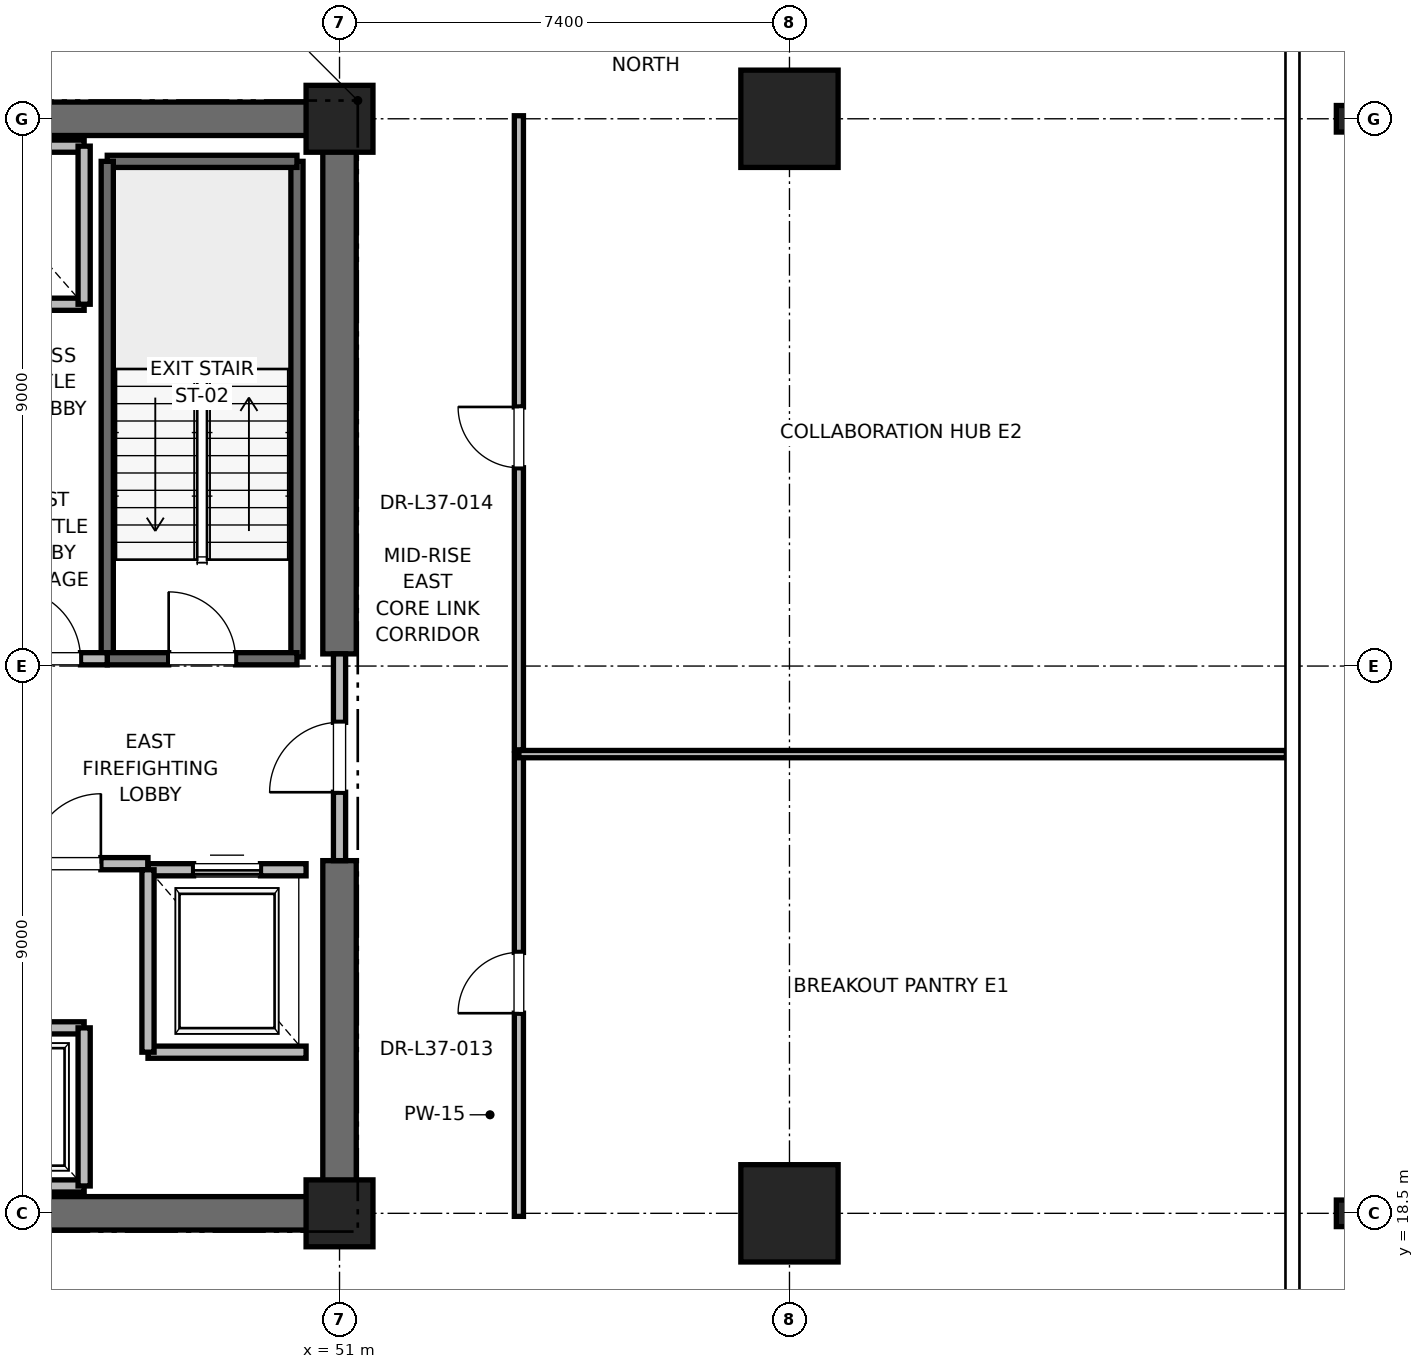
"""IFC4 building model, lengths in metres.
Left out: names, types, materials, properties, quantities, classifications, styles, units other than length and angle.
Written with IfcOpenShell. Run it as: python <this file> out.ifc"""

import sys

from ifc_helpers import new_model, si_unit, direction, frame, frame_2d, origin, origin_2d, place, context, subcontext, project, spatial, rectangle, i_section, extrude, element, fill, save


model = new_model("IFC4")
c1 = context("Model", 3, precision=1e-05, world=origin(), true_north=direction((0.0, 1.0)))
c2 = subcontext(c1, "Body", "Model", "MODEL_VIEW")
j1 = project(units=[si_unit("LENGTHUNIT", "METRE"), si_unit("PLANEANGLEUNIT", "RADIAN")], contexts=[c1])
p1 = place(None, origin())
s1 = spatial("IfcSite", under=j1, at=p1, CompositionType="ELEMENT")
p2 = place(p1, origin())
s2 = spatial("IfcBuilding", under=s1, at=p2, CompositionType="ELEMENT")
p3 = place(p2, frame((0.0, 0.0, 160.4)))
s3 = spatial("IfcBuildingStorey", under=s2, at=p3, CompositionType="ELEMENT", Elevation=160.4)
for number, where, z_axis, x_axis in (
    (1, (58.4, 18.5, 0.0), (0.0, 0.0, 1.0), (1.0, 0.0, 0.0)),
    (2, (58.4, 36.5, 0.0), (0.0, 0.0, 1.0), (1.0, 0.0, 0.0)),
):
    element("IfcColumn", number, at=place(p3, frame(where, z_axis=z_axis, x_axis=x_axis)), inside=s3, PredefinedType="COLUMN", context=c2, shape_type="SweptSolid", body=[
        extrude(rectangle(XDim=1.6, YDim=1.6, at=origin_2d()), origin(), (0.0, 0.0, 1.0), 4.0),
    ])
for number, where, z_axis, x_axis in (
    (3, (67.6, 18.5, 0.0), (0.0, 0.0, 1.0), (1.0, 0.0, 0.0)),
    (4, (67.6, 36.5, 0.0), (0.0, 0.0, 1.0), (1.0, 0.0, 0.0)),
):
    element("IfcColumn", number, at=place(p3, frame(where, z_axis=z_axis, x_axis=x_axis)), inside=s3, PredefinedType="COLUMN", context=c2, shape_type="SweptSolid", body=[
        extrude(i_section(OverallWidth=0.412, OverallDepth=0.437, WebThickness=0.036, FlangeThickness=0.058, FilletRadius=0.015, at=origin_2d()), origin(), (0.0, 0.0, 1.0), 4.0),
    ])
for number, where, z_axis, x_axis in (
    (5, (51.0, 18.5, 0.0), (0.0, 0.0, 1.0), (1.0, 0.0, 0.0)),
    (6, (51.0, 36.5, 0.0), (0.0, 0.0, 1.0), (1.0, 0.0, 0.0)),
):
    element("IfcColumn", number, at=place(p3, frame(where, z_axis=z_axis, x_axis=x_axis)), inside=s3, PredefinedType="PILASTER", context=c2, shape_type="SweptSolid", body=[
        extrude(rectangle(XDim=1.1, YDim=1.1, at=origin_2d()), origin(), (0.0, 0.0, 1.0), 4.0),
    ])
p4 = place(p3, frame((41.8, 18.5, 0.0), z_axis=(0.0, 0.0, 1.0), x_axis=(1.0, 0.0, 0.0)))
e7 = element("IfcWall", 7, at=p4, inside=s3, PredefinedType="SHEAR", context=c2, shape_type="SweptSolid", body=[
    extrude(rectangle(XDim=9.2, YDim=0.55, at=frame_2d((4.6, 0.0))), origin(), (0.0, 0.0, 1.0), 3.775),
])
for number, where, z_axis, x_axis in (
    (8, (45.2, 36.5, 0.0), (0.0, 0.0, 1.0), (1.0, 0.0, 0.0)),
    (9, (51.0, 18.5, 0.0), (0.0, 0.0, 1.0), (0.0, 1.0, 0.0)),
):
    element("IfcWall", number, at=place(p3, frame(where, z_axis=z_axis, x_axis=x_axis)), inside=s3, PredefinedType="SHEAR", context=c2, shape_type="SweptSolid", body=[
        extrude(rectangle(XDim=5.8, YDim=0.55, at=frame_2d((2.9, 0.0))), origin(), (0.0, 0.0, 1.0), 3.775),
    ])
p5 = place(p3, frame((51.0, 27.7, 0.0), z_axis=(0.0, 0.0, 1.0), x_axis=(0.0, 1.0, 0.0)))
e10 = element("IfcWall", 10, at=p5, inside=s3, PredefinedType="SHEAR", context=c2, shape_type="SweptSolid", body=[
    extrude(rectangle(XDim=8.8, YDim=0.55, at=frame_2d((4.4, 0.0))), origin(), (0.0, 0.0, 1.0), 3.775),
])
p6 = place(p3, frame((50.3, 27.65, 0.0), z_axis=(0.0, 0.0, 1.0), x_axis=(0.0, 1.0, 0.0)))
e11 = element("IfcWall", 11, at=p6, inside=s3, PredefinedType="SOLIDWALL", context=c2, shape_type="SweptSolid", body=[
    extrude(rectangle(XDim=8.15, YDim=0.2, at=frame_2d((4.075, 0.0))), origin(), (0.0, 0.0, 1.0), 3.775),
])
p7 = place(p3, frame((47.18, 35.8, 0.0), z_axis=(0.0, 0.0, 1.0), x_axis=(1.0, 0.0, 0.0)))
e12 = element("IfcWall", 12, at=p7, inside=s3, PredefinedType="SOLIDWALL", context=c2, shape_type="SweptSolid", body=[
    extrude(rectangle(XDim=3.12, YDim=0.2, at=frame_2d((1.56, 0.0))), origin(), (0.0, 0.0, 1.0), 3.775),
])
p8 = place(p3, frame((47.18, 27.62, 0.0), z_axis=(0.0, 0.0, 1.0), x_axis=(0.0, 1.0, 0.0)))
e13 = element("IfcWall", 13, at=p8, inside=s3, PredefinedType="SOLIDWALL", context=c2, shape_type="SweptSolid", body=[
    extrude(rectangle(XDim=8.18, YDim=0.2, at=frame_2d((4.09, 0.0))), origin(), (0.0, 0.0, 1.0), 3.775),
])
p9 = place(p3, frame((47.18, 27.62, 0.0), z_axis=(0.0, 0.0, 1.0), x_axis=(1.0, 0.0, 0.0)))
e14 = element("IfcWall", 14, at=p9, inside=s3, PredefinedType="SOLIDWALL", context=c2, shape_type="SweptSolid", body=[
    extrude(rectangle(XDim=3.12, YDim=0.2, at=frame_2d((1.56, 0.0))), origin(), (0.0, 0.0, 1.0), 3.775),
])
p10 = place(p9, frame((1.01, 0.0, 0.0)))
e15 = element("IfcOpeningElement", 15, at=p10, cuts=e14, PredefinedType="OPENING", context=c2, shape_type="SweptSolid", body=[
    extrude(rectangle(XDim=1.1, YDim=2.15, at=frame_2d((0.55, 1.075))), frame((0.0, 0.1, 0.0), z_axis=(0.0, -1.0, 0.0), x_axis=(1.0, 0.0, 0.0)), (0.0, 0.0, 1.0), 0.2),
])
p11 = place(p3, frame((45.15, 24.25, 0.0), z_axis=(0.0, 0.0, 1.0), x_axis=(1.0, 0.0, 0.0)))
e16 = element("IfcWall", 16, at=p11, inside=s3, PredefinedType="PARTITIONING", context=c2, shape_type="SweptSolid", body=[
    extrude(rectangle(XDim=2.7, YDim=0.2, at=frame_2d((1.35, 0.0))), origin(), (0.0, 0.0, 1.0), 3.775),
])
p12 = place(p11, frame((0.775, 0.0, 0.0)))
e17 = element("IfcOpeningElement", 17, at=p12, cuts=e16, PredefinedType="OPENING", context=c2, shape_type="SweptSolid", body=[
    extrude(rectangle(XDim=1.15, YDim=2.2, at=frame_2d((0.575, 1.1))), frame((0.0, 0.1, 0.0), z_axis=(0.0, -1.0, 0.0), x_axis=(1.0, 0.0, 0.0)), (0.0, 0.0, 1.0), 0.2),
])
p13 = place(p3, frame((45.15, 27.62, 0.0), z_axis=(0.0, 0.0, 1.0), x_axis=(1.0, 0.0, 0.0)))
e18 = element("IfcWall", 18, at=p13, inside=s3, PredefinedType="PARTITIONING", context=c2, shape_type="SweptSolid", body=[
    extrude(rectangle(XDim=2.03, YDim=0.2, at=frame_2d((1.015, 0.0))), origin(), (0.0, 0.0, 1.0), 3.775),
])
p14 = place(p13, frame((0.44, 0.0, 0.0)))
e19 = element("IfcOpeningElement", 19, at=p14, cuts=e18, PredefinedType="OPENING", context=c2, shape_type="SweptSolid", body=[
    extrude(rectangle(XDim=1.15, YDim=2.2, at=frame_2d((0.575, 1.1))), frame((0.0, 0.1, 0.0), z_axis=(0.0, -1.0, 0.0), x_axis=(1.0, 0.0, 0.0)), (0.0, 0.0, 1.0), 0.2),
])
p15 = place(p3, frame((51.0, 24.3, 0.0), z_axis=(0.0, 0.0, 1.0), x_axis=(0.0, 1.0, 0.0)))
e20 = element("IfcWall", 20, at=p15, inside=s3, PredefinedType="PARTITIONING", context=c2, shape_type="SweptSolid", body=[
    extrude(rectangle(XDim=3.4, YDim=0.2, at=frame_2d((1.7, 0.0))), origin(), (0.0, 0.0, 1.0), 2.755),
])
p16 = place(p15, frame((1.125, 0.0, 0.0)))
e21 = element("IfcOpeningElement", 21, at=p16, cuts=e20, PredefinedType="OPENING", context=c2, shape_type="SweptSolid", body=[
    extrude(rectangle(XDim=1.15, YDim=2.2, at=frame_2d((0.575, 1.1))), frame((0.0, 0.1, 0.0), z_axis=(0.0, -1.0, 0.0), x_axis=(1.0, 0.0, 0.0)), (0.0, 0.0, 1.0), 0.2),
])
p17 = place(p3, frame((47.85, 21.15, 0.0), z_axis=(0.0, 0.0, 1.0), x_axis=(1.0, 0.0, 0.0)))
e22 = element("IfcWall", 22, at=p17, inside=s3, PredefinedType="SOLIDWALL", context=c2, shape_type="SweptSolid", body=[
    extrude(rectangle(XDim=2.6, YDim=0.2, at=frame_2d((1.3, 0.0))), origin(), (0.0, 0.0, 1.0), 3.775),
])
p18 = place(p3, frame((50.45, 24.15, 0.0), z_axis=(0.0, 0.0, 1.0), x_axis=(-1.0, 0.0, 0.0)))
e23 = element("IfcWall", 23, at=p18, inside=s3, PredefinedType="SOLIDWALL", context=c2, shape_type="SweptSolid", body=[
    extrude(rectangle(XDim=2.6, YDim=0.2, at=frame_2d((1.3, 0.0))), origin(), (0.0, 0.0, 1.0), 2.755),
])
p19 = place(p18, frame((0.75, 0.0, 0.0)))
e24 = element("IfcOpeningElement", 24, at=p19, cuts=e23, PredefinedType="OPENING", context=c2, shape_type="SweptSolid", body=[
    extrude(rectangle(XDim=1.1, YDim=2.2, at=frame_2d((0.55, 1.1))), frame((0.0, 0.1, 0.0), z_axis=(0.0, -1.0, 0.0), x_axis=(1.0, 0.0, 0.0)), (0.0, 0.0, 1.0), 0.2),
])
p20 = place(p3, frame((47.85, 24.15, 0.0), z_axis=(0.0, 0.0, 1.0), x_axis=(0.0, -1.0, 0.0)))
e25 = element("IfcWall", 25, at=p20, inside=s3, PredefinedType="SOLIDWALL", context=c2, shape_type="SweptSolid", body=[
    extrude(rectangle(XDim=3.0, YDim=0.2, at=frame_2d((1.5, 0.0))), origin(), (0.0, 0.0, 1.0), 3.775),
])
p21 = place(p3, frame((44.5, 18.95, 0.0), z_axis=(0.0, 0.0, 1.0), x_axis=(1.0, 0.0, 0.0)))
e26 = element("IfcWall", 26, at=p21, inside=s3, PredefinedType="SOLIDWALL", context=c2, shape_type="SweptSolid", body=[
    extrude(rectangle(XDim=2.3, YDim=0.2, at=frame_2d((1.15, 0.0))), origin(), (0.0, 0.0, 1.0), 3.775),
])
p22 = place(p3, frame((46.8, 21.55, 0.0), z_axis=(0.0, 0.0, 1.0), x_axis=(-1.0, 0.0, 0.0)))
e27 = element("IfcWall", 27, at=p22, inside=s3, PredefinedType="SOLIDWALL", context=c2, shape_type="SweptSolid", body=[
    extrude(rectangle(XDim=2.3, YDim=0.2, at=frame_2d((1.15, 0.0))), origin(), (0.0, 0.0, 1.0), 3.775),
])
p23 = place(p22, frame((0.6, 0.0, 0.0)))
e28 = element("IfcOpeningElement", 28, at=p23, cuts=e27, PredefinedType="OPENING", context=c2, shape_type="SweptSolid", body=[
    extrude(rectangle(XDim=1.1, YDim=2.2, at=frame_2d((0.55, 1.1))), frame((0.0, 0.1, 0.0), z_axis=(0.0, -1.0, 0.0), x_axis=(1.0, 0.0, 0.0)), (0.0, 0.0, 1.0), 0.2),
])
p24 = place(p3, frame((46.8, 18.95, 0.0), z_axis=(0.0, 0.0, 1.0), x_axis=(0.0, 1.0, 0.0)))
e29 = element("IfcWall", 29, at=p24, inside=s3, PredefinedType="SOLIDWALL", context=c2, shape_type="SweptSolid", body=[
    extrude(rectangle(XDim=2.6, YDim=0.2, at=frame_2d((1.3, 0.0))), origin(), (0.0, 0.0, 1.0), 3.775),
])
p25 = place(p3, frame((44.5, 33.45, 0.0), z_axis=(0.0, 0.0, 1.0), x_axis=(1.0, 0.0, 0.0)))
e30 = element("IfcWall", 30, at=p25, inside=s3, PredefinedType="SOLIDWALL", context=c2, shape_type="SweptSolid", body=[
    extrude(rectangle(XDim=2.3, YDim=0.2, at=frame_2d((1.15, 0.0))), origin(), (0.0, 0.0, 1.0), 3.775),
])
p26 = place(p3, frame((46.8, 36.05, 0.0), z_axis=(0.0, 0.0, 1.0), x_axis=(-1.0, 0.0, 0.0)))
e31 = element("IfcWall", 31, at=p26, inside=s3, PredefinedType="SOLIDWALL", context=c2, shape_type="SweptSolid", body=[
    extrude(rectangle(XDim=2.3, YDim=0.2, at=frame_2d((1.15, 0.0))), origin(), (0.0, 0.0, 1.0), 2.755),
])
p27 = place(p3, frame((46.8, 33.45, 0.0), z_axis=(0.0, 0.0, 1.0), x_axis=(0.0, 1.0, 0.0)))
e32 = element("IfcWall", 32, at=p27, inside=s3, PredefinedType="SOLIDWALL", context=c2, shape_type="SweptSolid", body=[
    extrude(rectangle(XDim=2.6, YDim=0.2, at=frame_2d((1.3, 0.0))), origin(), (0.0, 0.0, 1.0), 3.775),
])
p28 = place(p3, frame((53.95, 18.45, 0.0), z_axis=(0.0, 0.0, 1.0), x_axis=(0.0, 1.0, 0.0)))
e33 = element("IfcWall", 33, at=p28, inside=s3, PredefinedType="PARTITIONING", context=c2, shape_type="SweptSolid", body=[
    extrude(rectangle(XDim=7.602, YDim=0.15, at=frame_2d((3.801, 0.0))), origin(), (0.0, 0.0, 1.0), 2.85),
])
p29 = place(p28, frame((3.341, 0.0, 0.0)))
e34 = element("IfcOpeningElement", 34, at=p29, cuts=e33, PredefinedType="OPENING", context=c2, shape_type="SweptSolid", body=[
    extrude(rectangle(XDim=1.0, YDim=2.15, at=frame_2d((0.5, 1.075))), frame((0.0, 0.075, 0.0), z_axis=(0.0, -1.0, 0.0), x_axis=(1.0, 0.0, 0.0)), (0.0, 0.0, 1.0), 0.15),
])
p30 = place(p3, frame((53.95, 26.052, 0.0), z_axis=(0.0, 0.0, 1.0), x_axis=(1.0, 0.0, 0.0)))
e35 = element("IfcWall", 35, at=p30, inside=s3, PredefinedType="PARTITIONING", context=c2, shape_type="SweptSolid", body=[
    extrude(rectangle(XDim=12.623, YDim=0.12, at=frame_2d((6.311, 0.0))), origin(), (0.0, 0.0, 1.0), 2.85),
])
p31 = place(p3, frame((53.95, 26.122, 0.0), z_axis=(0.0, 0.0, 1.0), x_axis=(0.0, 1.0, 0.0)))
e36 = element("IfcWall", 36, at=p31, inside=s3, PredefinedType="PARTITIONING", context=c2, shape_type="SweptSolid", body=[
    extrude(rectangle(XDim=10.428, YDim=0.15, at=frame_2d((5.214, 0.0))), origin(), (0.0, 0.0, 1.0), 2.85),
])
p32 = place(p31, frame((4.639, 0.0, 0.0)))
e37 = element("IfcOpeningElement", 37, at=p32, cuts=e36, PredefinedType="OPENING", context=c2, shape_type="SweptSolid", body=[
    extrude(rectangle(XDim=1.0, YDim=2.15, at=frame_2d((0.5, 1.075))), frame((0.0, 0.075, 0.0), z_axis=(0.0, -1.0, 0.0), x_axis=(1.0, 0.0, 0.0)), (0.0, 0.0, 1.0), 0.15),
])
p33 = place(p10, origin())
e38 = element("IfcDoor", 38, at=p33, inside=s3, OperationType="SINGLE_SWING_LEFT", PredefinedType="DOOR", context=c2, shape_type="SweptSolid", body=[
    extrude(rectangle(XDim=1.1, YDim=2.15, at=frame_2d((0.55, 1.075))), frame((0.0, 0.025, 0.0), z_axis=(0.0, -1.0, 0.0), x_axis=(1.0, 0.0, 0.0)), (0.0, 0.0, 1.0), 0.05),
])
fill(e15, e38)
p34 = place(p12, origin())
e39 = element("IfcDoor", 39, at=p34, inside=s3, OperationType="SINGLE_SWING_RIGHT", PredefinedType="DOOR", context=c2, shape_type="SweptSolid", body=[
    extrude(rectangle(XDim=1.15, YDim=2.2, at=frame_2d((0.575, 1.1))), frame((0.0, 0.025, 0.0), z_axis=(0.0, -1.0, 0.0), x_axis=(1.0, 0.0, 0.0)), (0.0, 0.0, 1.0), 0.05),
])
fill(e17, e39)
p35 = place(p14, origin())
e40 = element("IfcDoor", 40, at=p35, inside=s3, OperationType="SINGLE_SWING_LEFT", PredefinedType="DOOR", context=c2, shape_type="SweptSolid", body=[
    extrude(rectangle(XDim=1.15, YDim=2.2, at=frame_2d((0.575, 1.1))), frame((0.0, 0.025, 0.0), z_axis=(0.0, -1.0, 0.0), x_axis=(1.0, 0.0, 0.0)), (0.0, 0.0, 1.0), 0.05),
])
fill(e19, e40)
p36 = place(p16, origin())
e41 = element("IfcDoor", 41, at=p36, inside=s3, OperationType="SINGLE_SWING_LEFT", PredefinedType="DOOR", context=c2, shape_type="SweptSolid", body=[
    extrude(rectangle(XDim=1.15, YDim=2.2, at=frame_2d((0.575, 1.1))), frame((0.0, 0.025, 0.0), z_axis=(0.0, -1.0, 0.0), x_axis=(1.0, 0.0, 0.0)), (0.0, 0.0, 1.0), 0.05),
])
fill(e21, e41)
p37 = place(p19, origin())
e42 = element("IfcDoor", 42, at=p37, inside=s3, OperationType="SLIDING_TO_RIGHT", PredefinedType="DOOR", context=c2, shape_type="SweptSolid", body=[
    extrude(rectangle(XDim=1.1, YDim=2.2, at=frame_2d((0.55, 1.1))), frame((0.0, 0.025, 0.0), z_axis=(0.0, -1.0, 0.0), x_axis=(1.0, 0.0, 0.0)), (0.0, 0.0, 1.0), 0.05),
])
fill(e24, e42)
p38 = place(p29, origin())
e43 = element("IfcDoor", 43, at=p38, inside=s3, OperationType="SINGLE_SWING_LEFT", PredefinedType="DOOR", context=c2, shape_type="SweptSolid", body=[
    extrude(rectangle(XDim=1.0, YDim=2.15, at=frame_2d((0.5, 1.075))), frame((0.0, 0.025, 0.0), z_axis=(0.0, -1.0, 0.0), x_axis=(1.0, 0.0, 0.0)), (0.0, 0.0, 1.0), 0.05),
])
fill(e34, e43)
p39 = place(p32, origin())
e44 = element("IfcDoor", 44, at=p39, inside=s3, OperationType="SINGLE_SWING_RIGHT", PredefinedType="DOOR", context=c2, shape_type="SweptSolid", body=[
    extrude(rectangle(XDim=1.0, YDim=2.15, at=frame_2d((0.5, 1.075))), frame((0.0, 0.025, 0.0), z_axis=(0.0, -1.0, 0.0), x_axis=(1.0, 0.0, 0.0)), (0.0, 0.0, 1.0), 0.05),
])
fill(e37, e44)
save(model, sys.argv[1])
